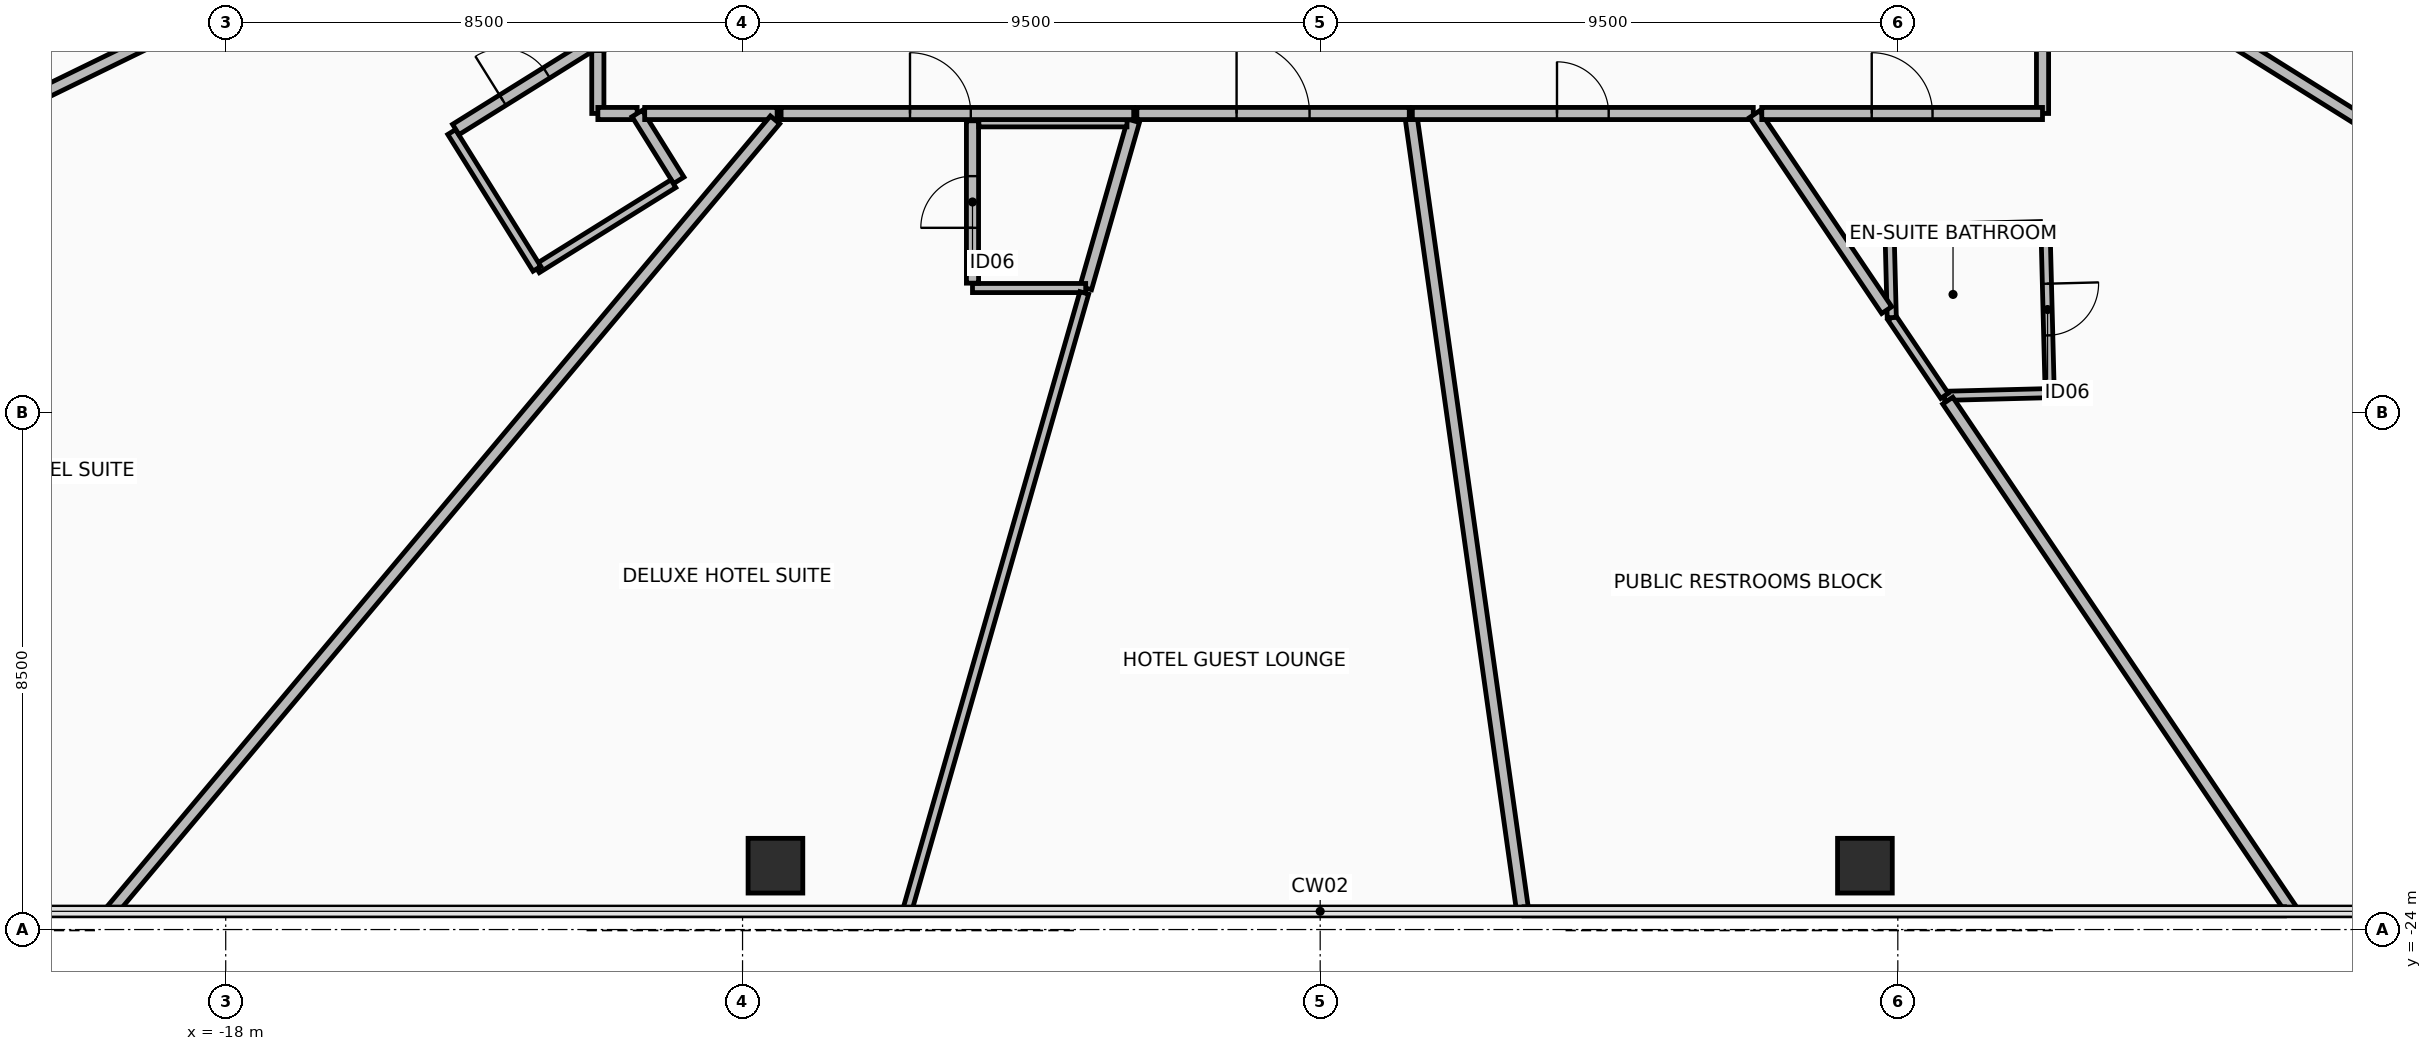
"""IFC4 building model, lengths in metres.
Left out: names, types, materials, properties, quantities, classifications, styles, units other than length and angle.
Written with IfcOpenShell. Run it as: python <this file> out.ifc"""

import sys

from ifc_helpers import new_model, si_unit, direction, frame, frame_2d, origin, origin_2d, place, context, subcontext, project, spatial, rectangle, hollow_rectangle, extrude, element, fill, save


model = new_model("IFC4")
c1 = context("Model", 3, precision=1e-05, world=origin(), true_north=direction((0.0, 1.0)))
c2 = subcontext(c1, "Body", "Model", "MODEL_VIEW")
j1 = project(units=[si_unit("LENGTHUNIT", "METRE"), si_unit("PLANEANGLEUNIT", "RADIAN")], contexts=[c1])
p1 = place(None, origin())
s1 = spatial("IfcSite", under=j1, at=p1, CompositionType="ELEMENT")
p2 = place(p1, origin())
s2 = spatial("IfcBuilding", under=s1, at=p2, CompositionType="ELEMENT")
p3 = place(p2, frame((0.0, 0.0, 35.25)))
s3 = spatial("IfcBuildingStorey", under=s2, at=p3, CompositionType="ELEMENT", Elevation=35.25)
for number, where, z_axis, x_axis in (
    (1, (-8.959, -22.95, 0.0), (0.0, 0.0, 1.0), (1.0, 0.0, 0.0)),
    (2, (8.959, -22.95, 0.0), (0.0, 0.0, 1.0), (1.0, 0.0, 0.0)),
):
    element("IfcColumn", number, at=place(p3, frame(where, z_axis=z_axis, x_axis=x_axis)), inside=s3, PredefinedType="COLUMN", context=c2, shape_type="SweptSolid", body=[
        extrude(hollow_rectangle(XDim=0.9, YDim=0.9, WallThickness=0.05, at=origin_2d()), origin(), (0.0, 0.0, 1.0), 3.4),
    ])
p4 = place(p3, frame((-11.88, -9.542, 0.0), z_axis=(0.0, 0.0, 1.0), x_axis=(0.0, -1.0, 0.0)))
e3 = element("IfcWall", 3, at=p4, inside=s3, PredefinedType="PARTITIONING", context=c2, shape_type="SweptSolid", body=[
    extrude(rectangle(XDim=1.037, YDim=0.2, at=frame_2d((0.519, 0.0))), origin(), (0.0, 0.0, 1.0), 2.62),
])
p5 = place(p3, frame((-11.879, -10.58, 0.0), z_axis=(0.0, 0.0, 1.0), x_axis=(1.0, 0.0, 0.0)))
e4 = element("IfcWall", 4, at=p5, inside=s3, PredefinedType="PARTITIONING", context=c2, shape_type="SweptSolid", body=[
    extrude(rectangle(XDim=0.646, YDim=0.2, at=frame_2d((0.323, 0.0))), origin(), (0.0, 0.0, 1.0), 3.225),
])
p6 = place(p3, frame((-11.233, -10.58, 0.0), z_axis=(0.0, 0.0, 1.0), x_axis=(0.528981470097, -0.848633374487, 0.0)))
e5 = element("IfcWall", 5, at=p6, inside=s3, PredefinedType="PARTITIONING", context=c2, shape_type="SweptSolid", body=[
    extrude(rectangle(XDim=1.295, YDim=0.2, at=frame_2d((0.647, 0.0))), origin(), (0.0, 0.0, 1.0), 3.225),
])
p7 = place(p3, frame((-10.637, -11.734, 0.0), z_axis=(0.0, 0.0, 1.0), x_axis=(-0.848630335856, -0.528986344876, 0.0)))
e6 = element("IfcWall", 6, at=p7, inside=s3, PredefinedType="PARTITIONING", context=c2, shape_type="SweptSolid", body=[
    extrude(rectangle(XDim=2.645, YDim=0.15, at=frame_2d((1.323, 0.0))), origin(), (0.0, 0.0, 1.0), 3.225),
])
p8 = place(p3, frame((-12.882, -13.133, 0.0), z_axis=(0.0, 0.0, 1.0), x_axis=(-0.529013096747, 0.848613659724, 0.0)))
e7 = element("IfcWall", 7, at=p8, inside=s3, PredefinedType="PARTITIONING", context=c2, shape_type="SweptSolid", body=[
    extrude(rectangle(XDim=2.65, YDim=0.15, at=frame_2d((1.325, 0.0))), origin(), (0.0, 0.0, 1.0), 2.62),
])
p9 = place(p3, frame((-14.216, -10.842, 0.0), z_axis=(0.0, 0.0, 1.0), x_axis=(0.848598757422, 0.529037001449, 0.0)))
e8 = element("IfcWall", 8, at=p9, inside=s3, PredefinedType="PARTITIONING", context=c2, shape_type="SweptSolid", body=[
    extrude(rectangle(XDim=2.67, YDim=0.2, at=frame_2d((1.335, 0.0))), origin(), (0.0, 0.0, 1.0), 2.62),
])
p10 = place(p9, frame((0.91, 0.0, 0.0)))
e9 = element("IfcOpeningElement", 9, at=p10, cuts=e8, PredefinedType="OPENING", context=c2, shape_type="SweptSolid", body=[
    extrude(rectangle(XDim=0.85, YDim=2.1, at=frame_2d((0.425, 1.05))), frame((0.0, 0.11, 0.0), z_axis=(0.0, -1.0, 0.0), x_axis=(1.0, 0.0, 0.0)), (0.0, 0.0, 1.0), 0.22),
])
p11 = place(p3, frame((-3.068, -10.7, 0.0), z_axis=(0.0, 0.0, 1.0), x_axis=(-0.275645239358, -0.961259435334, 0.0)))
e10 = element("IfcWall", 10, at=p11, inside=s3, PredefinedType="PARTITIONING", context=c2, shape_type="SweptSolid", body=[
    extrude(rectangle(XDim=2.861, YDim=0.2, at=frame_2d((1.43, 0.0))), origin(), (0.0, 0.0, 1.0), 3.225),
])
p12 = place(p3, frame((-3.857, -13.45, 0.0), z_axis=(0.0, 0.0, 1.0), x_axis=(-1.0, 0.0, 0.0)))
e11 = element("IfcWall", 11, at=p12, inside=s3, PredefinedType="PARTITIONING", context=c2, shape_type="SweptSolid", body=[
    extrude(rectangle(XDim=1.862, YDim=0.15, at=frame_2d((0.931, 0.0))), origin(), (0.0, 0.0, 1.0), 3.225),
])
p13 = place(p3, frame((-5.718, -13.37, 0.0), z_axis=(0.0, 0.0, 1.0), x_axis=(0.0, 1.0, 0.0)))
e12 = element("IfcWall", 12, at=p13, inside=s3, PredefinedType="PARTITIONING", context=c2, shape_type="SweptSolid", body=[
    extrude(rectangle(XDim=2.67, YDim=0.2, at=frame_2d((1.335, 0.0))), origin(), (0.0, 0.0, 1.0), 3.225),
])
p14 = place(p13, frame((0.91, 0.0, 0.0)))
e13 = element("IfcOpeningElement", 13, at=p14, cuts=e12, PredefinedType="OPENING", context=c2, shape_type="SweptSolid", body=[
    extrude(rectangle(XDim=0.85, YDim=2.1, at=frame_2d((0.425, 1.05))), frame((0.0, 0.11, 0.0), z_axis=(0.0, -1.0, 0.0), x_axis=(1.0, 0.0, 0.0)), (0.0, 0.0, 1.0), 0.22),
])
p15 = place(p3, frame((-5.613, -10.7, 0.0), z_axis=(0.0, 0.0, 1.0), x_axis=(1.0, 0.0, 0.0)))
e14 = element("IfcWall", 14, at=p15, inside=s3, PredefinedType="PARTITIONING", context=c2, shape_type="SweptSolid", body=[
    extrude(rectangle(XDim=2.436, YDim=0.2, at=frame_2d((1.218, 0.0))), origin(), (0.0, 0.0, 1.0), 3.225),
])
p16 = place(p3, frame((11.927, -12.429, 0.0), z_axis=(0.0, 0.0, 1.0), x_axis=(0.025746347005, -0.999668507864, 0.0)))
e15 = element("IfcWall", 15, at=p16, inside=s3, PredefinedType="PARTITIONING", context=c2, shape_type="SweptSolid", body=[
    extrude(rectangle(XDim=2.75, YDim=0.15, at=frame_2d((1.375, 0.0))), origin(), (0.0, 0.0, 1.0), 2.82),
])
p17 = place(p16, frame((0.95, 0.0, 0.0)))
e16 = element("IfcOpeningElement", 16, at=p17, cuts=e15, PredefinedType="OPENING", context=c2, shape_type="SweptSolid", body=[
    extrude(rectangle(XDim=0.85, YDim=2.1, at=frame_2d((0.425, 1.05))), frame((0.0, 0.085, 0.0), z_axis=(0.0, -1.0, 0.0), x_axis=(1.0, 0.0, 0.0)), (0.0, 0.0, 1.0), 0.17),
])
p18 = place(p3, frame((11.998, -15.178, 0.0), z_axis=(0.0, 0.0, 1.0), x_axis=(-0.999670410654, -0.025672359918, 0.0)))
e17 = element("IfcWall", 17, at=p18, inside=s3, PredefinedType="PARTITIONING", context=c2, shape_type="SweptSolid", body=[
    extrude(rectangle(XDim=1.731, YDim=0.15, at=frame_2d((0.865, 0.0))), origin(), (0.0, 0.0, 1.0), 3.225),
])
p19 = place(p3, frame((10.268, -15.223, 0.0), z_axis=(0.0, 0.0, 1.0), x_axis=(-0.559229675695, 0.82901276819, 0.0)))
e18 = element("IfcWall", 18, at=p19, inside=s3, PredefinedType="PARTITIONING", context=c2, shape_type="SweptSolid", body=[
    extrude(rectangle(XDim=1.552, YDim=0.15, at=frame_2d((0.776, 0.0))), origin(), (0.0, 0.0, 1.0), 2.82),
])
p20 = place(p3, frame((9.4, -13.936, 0.0), z_axis=(0.0, 0.0, 1.0), x_axis=(-0.025745445057, 0.999668531094, 0.0)))
e19 = element("IfcWall", 19, at=p20, inside=s3, PredefinedType="PARTITIONING", context=c2, shape_type="SweptSolid", body=[
    extrude(rectangle(XDim=1.441, YDim=0.15, at=frame_2d((0.721, 0.0))), origin(), (0.0, 0.0, 1.0), 3.225),
])
p21 = place(p3, frame((9.443, -12.493, 0.0), z_axis=(0.0, 0.0, 1.0), x_axis=(0.999667618691, 0.025780848324, 0.0)))
e20 = element("IfcWall", 20, at=p21, inside=s3, PredefinedType="PARTITIONING", context=c2, shape_type="SweptSolid", body=[
    extrude(rectangle(XDim=2.405, YDim=0.15, at=frame_2d((1.203, 0.0))), origin(), (0.0, 0.0, 1.0), 3.225),
])
p22 = place(p3, frame((-11.894, -5.801, 0.0), z_axis=(0.0, 0.0, 1.0), x_axis=(-0.898794397302, -0.438370427127, 0.0)))
e21 = element("IfcWall", 21, at=p22, inside=s3, PredefinedType="PARTITIONING", context=c2, shape_type="SweptSolid", body=[
    extrude(rectangle(XDim=16.273, YDim=0.2, at=frame_2d((8.137, 0.0))), origin(), (0.0, 0.0, 1.0), 2.42),
])
p23 = place(p3, frame((-26.427, -12.772, 0.0), z_axis=(0.0, 0.0, 1.0), x_axis=(0.499997662712, 0.866026753214, 0.0)))
e22 = element("IfcWall", 22, at=p23, inside=s3, PredefinedType="PARTITIONING", context=c2, shape_type="SweptSolid", body=[
    extrude(rectangle(XDim=13.95, YDim=0.15, at=frame_2d((6.975, 0.0))), origin(), (0.0, 0.0, 1.0), 3.225),
])
p24 = place(p3, frame((3.328, -23.678, 0.0), z_axis=(0.0, 0.0, 1.0), x_axis=(-0.13917575681, 0.990267695483, 0.0)))
e23 = element("IfcWall", 23, at=p24, inside=s3, PredefinedType="PARTITIONING", context=c2, shape_type="SweptSolid", body=[
    extrude(rectangle(XDim=13.198, YDim=0.2, at=frame_2d((6.599, 0.0))), origin(), (0.0, 0.0, 1.0), 2.42),
])
p25 = place(p3, frame((1.516, -10.58, 0.0), z_axis=(0.0, 0.0, 1.0), x_axis=(1.0, 0.0, 0.0)))
e24 = element("IfcWall", 24, at=p25, inside=s3, PredefinedType="PARTITIONING", context=c2, shape_type="SweptSolid", body=[
    extrude(rectangle(XDim=5.607, YDim=0.2, at=frame_2d((2.804, 0.0))), origin(), (0.0, 0.0, 1.0), 3.225),
])
p26 = place(p25, frame((2.379, 0.0, 0.0)))
e25 = element("IfcOpeningElement", 25, at=p26, cuts=e24, PredefinedType="OPENING", context=c2, shape_type="SweptSolid", body=[
    extrude(rectangle(XDim=0.85, YDim=2.1, at=frame_2d((0.425, 1.05))), frame((0.0, 0.11, 0.0), z_axis=(0.0, -1.0, 0.0), x_axis=(1.0, 0.0, 0.0)), (0.0, 0.0, 1.0), 0.22),
])
p27 = place(p3, frame((7.144, -10.591, 0.0), z_axis=(0.0, 0.0, 1.0), x_axis=(0.559171794076, -0.829051810631, 0.0)))
e26 = element("IfcWall", 26, at=p27, inside=s3, PredefinedType="PARTITIONING", context=c2, shape_type="SweptSolid", body=[
    extrude(rectangle(XDim=3.886, YDim=0.2, at=frame_2d((1.943, 0.0))), origin(), (0.0, 0.0, 1.0), 2.62),
])
p28 = place(p3, frame((10.321, -15.302, 0.0), z_axis=(0.0, 0.0, 1.0), x_axis=(0.559202536063, -0.829031075208, 0.0)))
e27 = element("IfcWall", 27, at=p28, inside=s3, PredefinedType="PARTITIONING", context=c2, shape_type="SweptSolid", body=[
    extrude(rectangle(XDim=10.13, YDim=0.2, at=frame_2d((5.065, 0.0))), origin(), (0.0, 0.0, 1.0), 2.42),
])
p29 = place(p3, frame((15.859, -23.7, 0.0), z_axis=(0.0, 0.0, 1.0), x_axis=(-1.0, 0.0, 0.0)))
e28 = element("IfcWall", 28, at=p29, inside=s3, PredefinedType="PARTITIONING", context=c2, shape_type="SweptSolid", body=[
    extrude(rectangle(XDim=12.507, YDim=0.15, at=frame_2d((6.253, 0.0))), origin(), (0.0, 0.0, 1.0), 3.225),
])
p30 = place(p3, frame((-11.11, -10.58, 0.0), z_axis=(0.0, 0.0, 1.0), x_axis=(1.0, 0.0, 0.0)))
e29 = element("IfcWall", 29, at=p30, inside=s3, PredefinedType="PARTITIONING", context=c2, shape_type="SweptSolid", body=[
    extrude(rectangle(XDim=2.178, YDim=0.2, at=frame_2d((1.089, 0.0))), origin(), (0.0, 0.0, 1.0), 2.62),
])
p31 = place(p3, frame((-8.966, -10.685, 0.0), z_axis=(0.0, 0.0, 1.0), x_axis=(-0.642784617016, -0.766046954258, 0.0)))
e30 = element("IfcWall", 30, at=p31, inside=s3, PredefinedType="PARTITIONING", context=c2, shape_type="SweptSolid", body=[
    extrude(rectangle(XDim=16.978, YDim=0.2, at=frame_2d((8.489, 0.0))), origin(), (0.0, 0.0, 1.0), 2.42),
])
p32 = place(p3, frame((-8.866, -10.58, 0.0), z_axis=(0.0, 0.0, 1.0), x_axis=(1.0, 0.0, 0.0)))
e31 = element("IfcWall", 31, at=p32, inside=s3, PredefinedType="PARTITIONING", context=c2, shape_type="SweptSolid", body=[
    extrude(rectangle(XDim=5.799, YDim=0.2, at=frame_2d((2.899, 0.0))), origin(), (0.0, 0.0, 1.0), 2.62),
])
p33 = place(p32, frame((2.12, 0.0, 0.0)))
e32 = element("IfcOpeningElement", 32, at=p33, cuts=e31, PredefinedType="OPENING", context=c2, shape_type="SweptSolid", body=[
    extrude(rectangle(XDim=1.0, YDim=2.15, at=frame_2d((0.5, 1.075))), frame((0.0, 0.11, 0.0), z_axis=(0.0, -1.0, 0.0), x_axis=(1.0, 0.0, 0.0)), (0.0, 0.0, 1.0), 0.22),
])
p34 = place(p3, frame((-3.88, -13.53, 0.0), z_axis=(0.0, 0.0, 1.0), x_axis=(-0.275649176222, -0.961258306413, 0.0)))
e33 = element("IfcWall", 33, at=p34, inside=s3, PredefinedType="PARTITIONING", context=c2, shape_type="SweptSolid", body=[
    extrude(rectangle(XDim=10.561, YDim=0.15, at=frame_2d((5.281, 0.0))), origin(), (0.0, 0.0, 1.0), 2.42),
])
p35 = place(p3, frame((-3.015, -10.58, 0.0), z_axis=(0.0, 0.0, 1.0), x_axis=(1.0, 0.0, 0.0)))
e34 = element("IfcWall", 34, at=p35, inside=s3, PredefinedType="PARTITIONING", context=c2, shape_type="SweptSolid", body=[
    extrude(rectangle(XDim=4.48, YDim=0.2, at=frame_2d((2.24, 0.0))), origin(), (0.0, 0.0, 1.0), 3.225),
])
p36 = place(p35, frame((1.64, 0.0, 0.0)))
e35 = element("IfcOpeningElement", 35, at=p36, cuts=e34, PredefinedType="OPENING", context=c2, shape_type="SweptSolid", body=[
    extrude(rectangle(XDim=1.2, YDim=2.15, at=frame_2d((0.6, 1.075))), frame((0.0, 0.11, 0.0), z_axis=(0.0, -1.0, 0.0), x_axis=(1.0, 0.0, 0.0)), (0.0, 0.0, 1.0), 0.22),
])
p37 = place(p3, frame((11.88, -10.579, 0.0), z_axis=(0.0, 0.0, 1.0), x_axis=(0.0, 1.0, 0.0)))
e36 = element("IfcWall", 36, at=p37, inside=s3, PredefinedType="PARTITIONING", context=c2, shape_type="SweptSolid", body=[
    extrude(rectangle(XDim=3.111, YDim=0.2, at=frame_2d((1.555, 0.0))), origin(), (0.0, 0.0, 1.0), 2.62),
])
p38 = place(p3, frame((11.985, -7.489, 0.0), z_axis=(0.0, 0.0, 1.0), x_axis=(0.848049879615, -0.529916410092, 0.0)))
e37 = element("IfcWall", 37, at=p38, inside=s3, PredefinedType="PARTITIONING", context=c2, shape_type="SweptSolid", body=[
    extrude(rectangle(XDim=21.007, YDim=0.2, at=frame_2d((10.504, 0.0))), origin(), (0.0, 0.0, 1.0), 2.42),
])
p39 = place(p3, frame((7.263, -10.58, 0.0), z_axis=(0.0, 0.0, 1.0), x_axis=(1.0, 0.0, 0.0)))
e38 = element("IfcWall", 38, at=p39, inside=s3, PredefinedType="PARTITIONING", context=c2, shape_type="SweptSolid", body=[
    extrude(rectangle(XDim=4.616, YDim=0.2, at=frame_2d((2.308, 0.0))), origin(), (0.0, 0.0, 1.0), 2.62),
])
p40 = place(p39, frame((1.808, 0.0, 0.0)))
e39 = element("IfcOpeningElement", 39, at=p40, cuts=e38, PredefinedType="OPENING", context=c2, shape_type="SweptSolid", body=[
    extrude(rectangle(XDim=1.0, YDim=2.15, at=frame_2d((0.5, 1.075))), frame((0.0, 0.11, 0.0), z_axis=(0.0, -1.0, 0.0), x_axis=(1.0, 0.0, 0.0)), (0.0, 0.0, 1.0), 0.22),
])
p41 = place(p10, origin())
e40 = element("IfcDoor", 40, at=p41, inside=s3, OperationType="SINGLE_SWING_RIGHT", PredefinedType="DOOR", context=c2, shape_type="SweptSolid", body=[
    extrude(rectangle(XDim=0.85, YDim=2.1, at=frame_2d((0.425, 1.05))), frame((0.0, 0.025, 0.0), z_axis=(0.0, -1.0, 0.0), x_axis=(1.0, 0.0, 0.0)), (0.0, 0.0, 1.0), 0.05),
])
fill(e9, e40)
p42 = place(p14, origin())
e41 = element("IfcDoor", 41, at=p42, inside=s3, OperationType="SINGLE_SWING_RIGHT", PredefinedType="DOOR", context=c2, shape_type="SweptSolid", body=[
    extrude(rectangle(XDim=0.85, YDim=2.1, at=frame_2d((0.425, 1.05))), frame((0.0, 0.025, 0.0), z_axis=(0.0, -1.0, 0.0), x_axis=(1.0, 0.0, 0.0)), (0.0, 0.0, 1.0), 0.05),
])
fill(e13, e41)
p43 = place(p17, origin())
e42 = element("IfcDoor", 42, at=p43, inside=s3, OperationType="SINGLE_SWING_RIGHT", PredefinedType="DOOR", context=c2, shape_type="SweptSolid", body=[
    extrude(rectangle(XDim=0.85, YDim=2.1, at=frame_2d((0.425, 1.05))), frame((0.0, 0.025, 0.0), z_axis=(0.0, -1.0, 0.0), x_axis=(1.0, 0.0, 0.0)), (0.0, 0.0, 1.0), 0.05),
])
fill(e16, e42)
p44 = place(p26, origin())
e43 = element("IfcDoor", 43, at=p44, inside=s3, OperationType="SINGLE_SWING_RIGHT", PredefinedType="DOOR", context=c2, shape_type="SweptSolid", body=[
    extrude(rectangle(XDim=0.85, YDim=2.1, at=frame_2d((0.425, 1.05))), frame((0.0, 0.025, 0.0), z_axis=(0.0, -1.0, 0.0), x_axis=(1.0, 0.0, 0.0)), (0.0, 0.0, 1.0), 0.05),
])
fill(e25, e43)
p45 = place(p33, origin())
e44 = element("IfcDoor", 44, at=p45, inside=s3, OperationType="SINGLE_SWING_LEFT", PredefinedType="DOOR", context=c2, shape_type="SweptSolid", body=[
    extrude(rectangle(XDim=1.0, YDim=2.15, at=frame_2d((0.5, 1.075))), frame((0.0, 0.025, 0.0), z_axis=(0.0, -1.0, 0.0), x_axis=(1.0, 0.0, 0.0)), (0.0, 0.0, 1.0), 0.05),
])
fill(e32, e44)
p46 = place(p36, origin())
e45 = element("IfcDoor", 45, at=p46, inside=s3, OperationType="SINGLE_SWING_LEFT", PredefinedType="DOOR", context=c2, shape_type="SweptSolid", body=[
    extrude(rectangle(XDim=1.2, YDim=2.15, at=frame_2d((0.6, 1.075))), frame((0.0, 0.025, 0.0), z_axis=(0.0, -1.0, 0.0), x_axis=(1.0, 0.0, 0.0)), (0.0, 0.0, 1.0), 0.05),
])
fill(e35, e45)
p47 = place(p40, origin())
e46 = element("IfcDoor", 46, at=p47, inside=s3, OperationType="SINGLE_SWING_LEFT", PredefinedType="DOOR", context=c2, shape_type="SweptSolid", body=[
    extrude(rectangle(XDim=1.0, YDim=2.15, at=frame_2d((0.5, 1.075))), frame((0.0, 0.025, 0.0), z_axis=(0.0, -1.0, 0.0), x_axis=(1.0, 0.0, 0.0)), (0.0, 0.0, 1.0), 0.05),
])
fill(e39, e46)
save(model, sys.argv[1])
